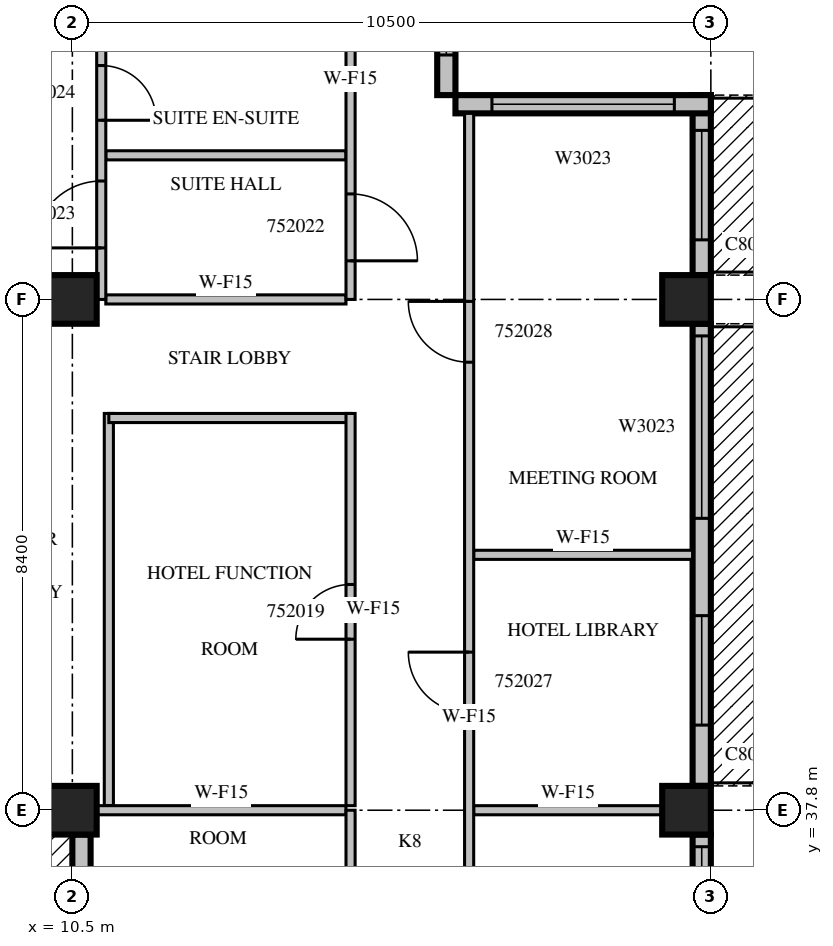
"""IFC4 building model, lengths in metres.
Left out: names, types, materials, properties, quantities, classifications, styles, units other than length and angle.
Written with IfcOpenShell. Run it as: python <this file> out.ifc"""

import sys

from ifc_helpers import new_model, si_unit, direction, frame, frame_2d, origin, origin_2d, place, context, subcontext, project, spatial, rectangle, extrude, source, transform, mapped, element, fill, save


model = new_model("IFC4")
c1 = context("Model", 3, precision=1e-05, world=origin(), true_north=direction((0.0, 1.0)))
c2 = subcontext(c1, "Body", "Model", "MODEL_VIEW")
j1 = project(units=[si_unit("LENGTHUNIT", "METRE"), si_unit("PLANEANGLEUNIT", "RADIAN")], contexts=[c1])
p1 = place(None, origin())
s1 = spatial("IfcSite", under=j1, at=p1, CompositionType="ELEMENT")
p2 = place(p1, origin())
s2 = spatial("IfcBuilding", under=s1, at=p2, CompositionType="ELEMENT")
p3 = place(p2, frame((0.0, 0.0, 231.0)))
s3 = spatial("IfcBuildingStorey", under=s2, at=p3, CompositionType="ELEMENT", Elevation=231.0)
m1 = source(origin(), c2, "Body", "SweptSolid", [
    extrude(rectangle(XDim=0.8, YDim=0.8, at=origin_2d()), origin(), (0.0, 0.0, 1.0), 3.8),
])
for number, where, z_axis, x_axis in (
    (1, (10.5, 37.8, 0.0), (0.0, 0.0, 1.0), (1.0, 0.0, 0.0)),
    (2, (20.6, 37.8, 0.0), (0.0, 0.0, 1.0), (1.0, 0.0, 0.0)),
    (3, (10.5, 46.2, 0.0), (0.0, 0.0, 1.0), (1.0, 0.0, 0.0)),
    (4, (20.6, 46.2, 0.0), (0.0, 0.0, 1.0), (1.0, 0.0, 0.0)),
):
    element("IfcColumn", number, at=place(p3, frame(where, z_axis=z_axis, x_axis=x_axis)), inside=s3, PredefinedType="COLUMN", context=c2, shape_type="MappedRepresentation", body=[
        mapped(m1, transform((0.0, 0.0, 0.0), scale=1.0)),
    ])
m2 = source(origin(), c2, "Body", "SweptSolid", [
    extrude(rectangle(XDim=7.6, YDim=0.3, at=frame_2d((3.8, 0.0))), origin(), (0.0, 0.0, 1.0), 3.4),
])
p4 = place(p3, frame((20.85, 29.8, 0.0), z_axis=(0.0, 0.0, 1.0), x_axis=(0.0, 1.0, 0.0)))
e5 = element("IfcWall", 5, at=p4, inside=s3, PredefinedType="STANDARD", context=c2, shape_type="MappedRepresentation", body=[
    mapped(m2, transform((0.0, 0.0, 0.0), scale=1.0)),
])
m3 = source(origin(), c2, "Body", "SweptSolid", [
    extrude(rectangle(XDim=3.0, YDim=2.3, at=frame_2d((1.5, 1.15))), frame((0.0, 0.16, 0.0), z_axis=(0.0, -1.0, 0.0), x_axis=(1.0, 0.0, 0.0)), (0.0, 0.0, 1.0), 0.32),
])
p5 = place(p4, frame((0.2, 0.0, 0.6)))
e6 = element("IfcOpeningElement", 6, at=p5, cuts=e5, PredefinedType="OPENING", context=c2, shape_type="MappedRepresentation", body=[
    mapped(m3, transform((0.0, 0.0, 0.0), scale=1.0)),
])
p6 = place(p4, frame((4.4, 0.0, 0.6)))
e7 = element("IfcOpeningElement", 7, at=p6, cuts=e5, PredefinedType="OPENING", context=c2, shape_type="MappedRepresentation", body=[
    mapped(m3, transform((0.0, 0.0, 0.0), scale=1.0)),
])
p7 = place(p3, frame((20.85, 38.2, 0.0), z_axis=(0.0, 0.0, 1.0), x_axis=(0.0, 1.0, 0.0)))
e8 = element("IfcWall", 8, at=p7, inside=s3, PredefinedType="STANDARD", context=c2, shape_type="MappedRepresentation", body=[
    mapped(m2, transform((0.0, 0.0, 0.0), scale=1.0)),
])
m4 = source(origin(), c2, "Body", "SweptSolid", [
    extrude(rectangle(XDim=1.8, YDim=2.4, at=frame_2d((0.9, 1.2))), frame((0.0, 0.16, 0.0), z_axis=(0.0, -1.0, 0.0), x_axis=(1.0, 0.0, 0.0)), (0.0, 0.0, 1.0), 0.32),
])
p8 = place(p7, frame((1.0, 0.0, 0.0)))
e9 = element("IfcOpeningElement", 9, at=p8, cuts=e8, PredefinedType="OPENING", context=c2, shape_type="MappedRepresentation", body=[
    mapped(m4, transform((0.0, 0.0, 0.0), scale=1.0)),
])
p9 = place(p7, frame((4.4, 0.0, 0.6)))
e10 = element("IfcOpeningElement", 10, at=p9, cuts=e8, PredefinedType="OPENING", context=c2, shape_type="MappedRepresentation", body=[
    mapped(m3, transform((0.0, 0.0, 0.0), scale=1.0)),
])
m5 = source(origin(), c2, "Body", "SweptSolid", [
    extrude(rectangle(XDim=2.96, YDim=0.3, at=frame_2d((1.48, 0.0))), origin(), (0.0, 0.0, 1.0), 3.4),
])
p10 = place(p3, frame((20.85, 46.6, 0.0), z_axis=(0.0, 0.0, 1.0), x_axis=(0.0, 1.0, 0.0)))
e11 = element("IfcWall", 11, at=p10, inside=s3, PredefinedType="STANDARD", context=c2, shape_type="MappedRepresentation", body=[
    mapped(m5, transform((0.0, 0.0, 0.0), scale=1.0)),
])
p11 = place(p10, frame((0.58, 0.0, 0.0)))
e12 = element("IfcOpeningElement", 12, at=p11, cuts=e11, PredefinedType="OPENING", context=c2, shape_type="MappedRepresentation", body=[
    mapped(m4, transform((0.0, 0.0, 0.0), scale=1.0)),
])
m6 = source(origin(), c2, "Body", "SweptSolid", [
    extrude(rectangle(XDim=4.2, YDim=0.3, at=frame_2d((2.1, 0.0))), origin(), (0.0, 0.0, 1.0), 3.4),
])
p12 = place(p3, frame((21.0, 49.41, 0.0), z_axis=(0.0, 0.0, 1.0), x_axis=(-1.0, 0.0, 0.0)))
e13 = element("IfcWall", 13, at=p12, inside=s3, PredefinedType="STANDARD", context=c2, shape_type="MappedRepresentation", body=[
    mapped(m6, transform((0.0, 0.0, 0.0), scale=1.0)),
])
p13 = place(p12, frame((0.6, 0.0, 0.6)))
e14 = element("IfcOpeningElement", 14, at=p13, cuts=e13, PredefinedType="OPENING", context=c2, shape_type="MappedRepresentation", body=[
    mapped(m3, transform((0.0, 0.0, 0.0), scale=1.0)),
])
m7 = source(origin(), c2, "Body", "SweptSolid", [
    extrude(rectangle(XDim=2.52, YDim=0.3, at=frame_2d((1.26, 0.0))), origin(), (0.0, 0.0, 1.0), 3.4),
])
p14 = place(p3, frame((16.65, 49.56, 0.0), z_axis=(0.0, 0.0, 1.0), x_axis=(0.0, 1.0, 0.0)))
e15 = element("IfcWall", 15, at=p14, inside=s3, PredefinedType="STANDARD", context=c2, shape_type="MappedRepresentation", body=[
    mapped(m7, transform((0.0, 0.0, 0.0), scale=1.0)),
])
m8 = source(origin(), c2, "Body", "SweptSolid", [
    extrude(rectangle(XDim=1.2, YDim=2.3, at=frame_2d((0.6, 1.15))), frame((0.0, 0.16, 0.0), z_axis=(0.0, -1.0, 0.0), x_axis=(1.0, 0.0, 0.0)), (0.0, 0.0, 1.0), 0.32),
])
p15 = place(p14, frame((0.66, 0.0, 0.6)))
e16 = element("IfcOpeningElement", 16, at=p15, cuts=e15, PredefinedType="OPENING", context=c2, shape_type="MappedRepresentation", body=[
    mapped(m8, transform((0.0, 0.0, 0.0), scale=1.0)),
])
p16 = place(p3, frame((10.65, 37.4, 0.0), z_axis=(0.0, 0.0, 1.0), x_axis=(0.0, -1.0, 0.0)))
e17 = element("IfcWall", 17, at=p16, inside=s3, PredefinedType="STANDARD", context=c2, shape_type="MappedRepresentation", body=[
    mapped(m2, transform((0.0, 0.0, 0.0), scale=1.0)),
])
p17 = place(p16, frame((0.65, 0.0, 0.0)))
e18 = element("IfcOpeningElement", 18, at=p17, cuts=e17, PredefinedType="OPENING", context=c2, shape_type="MappedRepresentation", body=[
    mapped(m4, transform((0.0, 0.0, 0.0), scale=1.0)),
])
p18 = place(p16, frame((4.061, 0.0, 0.6)))
e19 = element("IfcOpeningElement", 19, at=p18, cuts=e17, PredefinedType="OPENING", context=c2, shape_type="MappedRepresentation", body=[
    mapped(m8, transform((0.0, 0.0, 0.0), scale=1.0)),
])
m9 = source(origin(), c2, "Body", "SweptSolid", [
    extrude(rectangle(XDim=6.45, YDim=0.15, at=frame_2d((3.225, 0.0))), origin(), (0.0, 0.0, 1.0), 3.4),
])
p19 = place(p3, frame((11.1, 44.325, 0.0), z_axis=(0.0, 0.0, 1.0), x_axis=(0.0, -1.0, 0.0)))
e20 = element("IfcWall", 20, at=p19, inside=s3, PredefinedType="PARTITIONING", context=c2, shape_type="MappedRepresentation", body=[
    mapped(m9, transform((0.0, 0.0, 0.0), scale=1.0)),
])
m10 = source(origin(), c2, "Body", "SweptSolid", [
    extrude(rectangle(XDim=3.975, YDim=0.15, at=frame_2d((1.988, 0.0))), origin(), (0.0, 0.0, 1.0), 3.4),
])
p20 = place(p3, frame((15.075, 44.25, 0.0), z_axis=(0.0, 0.0, 1.0), x_axis=(-1.0, 0.0, 0.0)))
e21 = element("IfcWall", 21, at=p20, inside=s3, PredefinedType="PARTITIONING", context=c2, shape_type="MappedRepresentation", body=[
    mapped(m10, transform((0.0, 0.0, 0.0), scale=1.0)),
])
p21 = place(p3, frame((15.075, 37.875, 0.0), z_axis=(0.0, 0.0, 1.0), x_axis=(0.0, 1.0, 0.0)))
e22 = element("IfcWall", 22, at=p21, inside=s3, PredefinedType="PARTITIONING", context=c2, shape_type="MappedRepresentation", body=[
    mapped(m9, transform((0.0, 0.0, 0.0), scale=1.0)),
])
m11 = source(origin(), c2, "Body", "SweptSolid", [
    extrude(rectangle(XDim=0.9, YDim=2.1, at=frame_2d((0.45, 1.05))), frame((0.0, 0.085, 0.0), z_axis=(0.0, -1.0, 0.0), x_axis=(1.0, 0.0, 0.0)), (0.0, 0.0, 1.0), 0.17),
])
p22 = place(p21, frame((2.737, 0.0, 0.0)))
e23 = element("IfcOpeningElement", 23, at=p22, cuts=e22, PredefinedType="OPENING", context=c2, shape_type="MappedRepresentation", body=[
    mapped(m11, transform((0.0, 0.0, 0.0), scale=1.0)),
])
m12 = source(origin(), c2, "Body", "SweptSolid", [
    extrude(rectangle(XDim=4.101, YDim=0.15, at=frame_2d((2.05, 0.0))), origin(), (0.0, 0.0, 1.0), 3.4),
])
p23 = place(p3, frame((15.0, 37.8, 0.0), z_axis=(0.0, 0.0, 1.0), x_axis=(-1.0, 0.0, 0.0)))
e24 = element("IfcWall", 24, at=p23, inside=s3, PredefinedType="PARTITIONING", context=c2, shape_type="MappedRepresentation", body=[
    mapped(m12, transform((0.0, 0.0, 0.0), scale=1.0)),
])
m13 = source(origin(), c2, "Body", "SweptSolid", [
    extrude(rectangle(XDim=3.95, YDim=0.15, at=frame_2d((1.975, 0.0))), origin(), (0.0, 0.0, 1.0), 3.4),
])
for number, where, z_axis, x_axis in (
    (25, (15.0, 48.57, 0.0), (0.0, 0.0, 1.0), (-1.0, 0.0, 0.0)),
    (26, (15.0, 46.2, 0.0), (0.0, 0.0, 1.0), (-1.0, 0.0, 0.0)),
):
    element("IfcWall", number, at=place(p3, frame(where, z_axis=z_axis, x_axis=x_axis)), inside=s3, PredefinedType="PARTITIONING", context=c2, shape_type="MappedRepresentation", body=[
        mapped(m13, transform((0.0, 0.0, 0.0), scale=1.0)),
    ])
m14 = source(origin(), c2, "Body", "SweptSolid", [
    extrude(rectangle(XDim=7.26, YDim=0.15, at=frame_2d((3.63, 0.0))), origin(), (0.0, 0.0, 1.0), 3.4),
])
p24 = place(p3, frame((10.975, 46.2, 0.0), z_axis=(0.0, 0.0, 1.0), x_axis=(0.0, 1.0, 0.0)))
e27 = element("IfcWall", 27, at=p24, inside=s3, PredefinedType="PARTITIONING", context=c2, shape_type="MappedRepresentation", body=[
    mapped(m14, transform((0.0, 0.0, 0.0), scale=1.0)),
])
m15 = source(origin(), c2, "Body", "SweptSolid", [
    extrude(rectangle(XDim=1.1, YDim=2.1, at=frame_2d((0.55, 1.05))), frame((0.0, 0.085, 0.0), z_axis=(0.0, -1.0, 0.0), x_axis=(1.0, 0.0, 0.0)), (0.0, 0.0, 1.0), 0.17),
])
p25 = place(p24, frame((0.847, 0.0, 0.0)))
e28 = element("IfcOpeningElement", 28, at=p25, cuts=e27, PredefinedType="OPENING", context=c2, shape_type="MappedRepresentation", body=[
    mapped(m15, transform((0.0, 0.0, 0.0), scale=1.0)),
])
p26 = place(p24, frame((2.946, 0.0, 0.0)))
e29 = element("IfcOpeningElement", 29, at=p26, cuts=e27, PredefinedType="OPENING", context=c2, shape_type="MappedRepresentation", body=[
    mapped(m11, transform((0.0, 0.0, 0.0), scale=1.0)),
])
p27 = place(p24, frame((4.529, 0.0, 0.0)))
e30 = element("IfcOpeningElement", 30, at=p27, cuts=e27, PredefinedType="OPENING", context=c2, shape_type="MappedRepresentation", body=[
    mapped(m11, transform((0.0, 0.0, 0.0), scale=1.0)),
])
m16 = source(origin(), c2, "Body", "SweptSolid", [
    extrude(rectangle(XDim=3.101, YDim=0.15, at=frame_2d((1.55, 0.0))), origin(), (0.0, 0.0, 1.0), 3.4),
])
p28 = place(p3, frame((20.201, 37.8, 0.0), z_axis=(0.0, 0.0, 1.0), x_axis=(-1.0, 0.0, 0.0)))
e31 = element("IfcWall", 31, at=p28, inside=s3, PredefinedType="PARTITIONING", context=c2, shape_type="MappedRepresentation", body=[
    mapped(m16, transform((0.0, 0.0, 0.0), scale=1.0)),
])
m17 = source(origin(), c2, "Body", "SweptSolid", [
    extrude(rectangle(XDim=3.6, YDim=0.15, at=frame_2d((1.8, 0.0))), origin(), (0.0, 0.0, 1.0), 3.4),
])
p29 = place(p3, frame((20.7, 42.0, 0.0), z_axis=(0.0, 0.0, 1.0), x_axis=(-1.0, 0.0, 0.0)))
e32 = element("IfcWall", 32, at=p29, inside=s3, PredefinedType="PARTITIONING", context=c2, shape_type="MappedRepresentation", body=[
    mapped(m17, transform((0.0, 0.0, 0.0), scale=1.0)),
])
m18 = source(origin(), c2, "Body", "SweptSolid", [
    extrude(rectangle(XDim=8.4, YDim=0.15, at=frame_2d((4.2, 0.0))), origin(), (0.0, 0.0, 1.0), 3.4),
])
p30 = place(p3, frame((15.075, 29.4, 0.0), z_axis=(0.0, 0.0, 1.0), x_axis=(0.0, 1.0, 0.0)))
e33 = element("IfcWall", 33, at=p30, inside=s3, PredefinedType="PARTITIONING", context=c2, shape_type="MappedRepresentation", body=[
    mapped(m18, transform((0.0, 0.0, 0.0), scale=1.0)),
])
p31 = place(p30, frame((0.638, 0.0, 0.0)))
e34 = element("IfcOpeningElement", 34, at=p31, cuts=e33, PredefinedType="OPENING", context=c2, shape_type="MappedRepresentation", body=[
    mapped(m15, transform((0.0, 0.0, 0.0), scale=1.0)),
])
p32 = place(p3, frame((15.075, 46.2, 0.0), z_axis=(0.0, 0.0, 1.0), x_axis=(0.0, 1.0, 0.0)))
e35 = element("IfcWall", 35, at=p32, inside=s3, PredefinedType="PARTITIONING", context=c2, shape_type="MappedRepresentation", body=[
    mapped(m14, transform((0.0, 0.0, 0.0), scale=1.0)),
])
p33 = place(p32, frame((0.635, 0.0, 0.0)))
e36 = element("IfcOpeningElement", 36, at=p33, cuts=e35, PredefinedType="OPENING", context=c2, shape_type="MappedRepresentation", body=[
    mapped(m15, transform((0.0, 0.0, 0.0), scale=1.0)),
])
m19 = source(origin(), c2, "Body", "SweptSolid", [
    extrude(rectangle(XDim=19.86, YDim=0.15, at=frame_2d((9.93, 0.0))), origin(), (0.0, 0.0, 1.0), 3.4),
])
p34 = place(p3, frame((17.025, 49.26, 0.0), z_axis=(0.0, 0.0, 1.0), x_axis=(0.0, -1.0, 0.0)))
e37 = element("IfcWall", 37, at=p34, inside=s3, PredefinedType="PARTITIONING", context=c2, shape_type="MappedRepresentation", body=[
    mapped(m19, transform((0.0, 0.0, 0.0), scale=1.0)),
])
m20 = source(origin(), c2, "Body", "SweptSolid", [
    extrude(rectangle(XDim=1.2, YDim=2.1, at=frame_2d((0.6, 1.05))), frame((0.0, 0.085, 0.0), z_axis=(0.0, -1.0, 0.0), x_axis=(1.0, 0.0, 0.0)), (0.0, 0.0, 1.0), 0.17),
])
p35 = place(p34, frame((15.06, 0.0, 0.0)))
e38 = element("IfcOpeningElement", 38, at=p35, cuts=e37, PredefinedType="OPENING", context=c2, shape_type="MappedRepresentation", body=[
    mapped(m20, transform((0.0, 0.0, 0.0), scale=1.0)),
])
m21 = source(origin(), c2, "Body", "SweptSolid", [
    extrude(rectangle(XDim=1.0, YDim=2.1, at=frame_2d((0.5, 1.05))), frame((0.0, 0.085, 0.0), z_axis=(0.0, -1.0, 0.0), x_axis=(1.0, 0.0, 0.0)), (0.0, 0.0, 1.0), 0.17),
])
p36 = place(p34, frame((8.86, 0.0, 0.0)))
e39 = element("IfcOpeningElement", 39, at=p36, cuts=e37, PredefinedType="OPENING", context=c2, shape_type="MappedRepresentation", body=[
    mapped(m21, transform((0.0, 0.0, 0.0), scale=1.0)),
])
p37 = place(p34, frame((3.092, 0.0, 0.0)))
e40 = element("IfcOpeningElement", 40, at=p37, cuts=e37, PredefinedType="OPENING", context=c2, shape_type="MappedRepresentation", body=[
    mapped(m21, transform((0.0, 0.0, 0.0), scale=1.0)),
])
m22 = source(origin(), c2, "Body", "SweptSolid", [
    extrude(rectangle(XDim=3.0, YDim=2.3, at=frame_2d((1.5, 1.15))), frame((0.0, 0.03, 0.0), z_axis=(0.0, -1.0, 0.0), x_axis=(1.0, 0.0, 0.0)), (0.0, 0.0, 1.0), 0.06),
])
p38 = place(p6, origin())
e41 = element("IfcWindow", 41, at=p38, inside=s3, PartitioningType="SINGLE_PANEL", PredefinedType="WINDOW", context=c2, shape_type="MappedRepresentation", body=[
    mapped(m22, transform((0.0, 0.0, 0.0), scale=1.0)),
])
fill(e7, e41)
m23 = source(origin(), c2, "Body", "SweptSolid", [
    extrude(rectangle(XDim=1.8, YDim=2.4, at=frame_2d((0.9, 1.2))), frame((0.0, 0.025, 0.0), z_axis=(0.0, -1.0, 0.0), x_axis=(1.0, 0.0, 0.0)), (0.0, 0.0, 1.0), 0.05),
])
p39 = place(p8, origin())
e42 = element("IfcDoor", 42, at=p39, inside=s3, OperationType="SLIDING_TO_LEFT", PredefinedType="DOOR", context=c2, shape_type="MappedRepresentation", body=[
    mapped(m23, transform((0.0, 0.0, 0.0), scale=1.0)),
])
fill(e9, e42)
p40 = place(p9, origin())
e43 = element("IfcWindow", 43, at=p40, inside=s3, PartitioningType="SINGLE_PANEL", PredefinedType="WINDOW", context=c2, shape_type="MappedRepresentation", body=[
    mapped(m22, transform((0.0, 0.0, 0.0), scale=1.0)),
])
fill(e10, e43)
p41 = place(p11, origin())
e44 = element("IfcDoor", 44, at=p41, inside=s3, OperationType="SLIDING_TO_LEFT", PredefinedType="DOOR", context=c2, shape_type="MappedRepresentation", body=[
    mapped(m23, transform((0.0, 0.0, 0.0), scale=1.0)),
])
fill(e12, e44)
p42 = place(p13, origin())
e45 = element("IfcWindow", 45, at=p42, inside=s3, PartitioningType="SINGLE_PANEL", PredefinedType="WINDOW", context=c2, shape_type="MappedRepresentation", body=[
    mapped(m22, transform((0.0, 0.0, 0.0), scale=1.0)),
])
fill(e14, e45)
m24 = source(origin(), c2, "Body", "SweptSolid", [
    extrude(rectangle(XDim=1.2, YDim=2.3, at=frame_2d((0.6, 1.15))), frame((0.0, 0.03, 0.0), z_axis=(0.0, -1.0, 0.0), x_axis=(1.0, 0.0, 0.0)), (0.0, 0.0, 1.0), 0.06),
])
p43 = place(p15, origin())
e46 = element("IfcWindow", 46, at=p43, inside=s3, PartitioningType="SINGLE_PANEL", PredefinedType="WINDOW", context=c2, shape_type="MappedRepresentation", body=[
    mapped(m24, transform((0.0, 0.0, 0.0), scale=1.0)),
])
fill(e16, e46)
m25 = source(origin(), c2, "Body", "SweptSolid", [
    extrude(rectangle(XDim=0.9, YDim=2.1, at=frame_2d((0.45, 1.05))), frame((0.0, 0.025, 0.0), z_axis=(0.0, -1.0, 0.0), x_axis=(1.0, 0.0, 0.0)), (0.0, 0.0, 1.0), 0.05),
])
p44 = place(p22, origin())
e47 = element("IfcDoor", 47, at=p44, inside=s3, OperationType="SINGLE_SWING_LEFT", PredefinedType="DOOR", context=c2, shape_type="MappedRepresentation", body=[
    mapped(m25, transform((0.0, 0.0, 0.0), scale=1.0)),
])
fill(e23, e47)
m26 = source(origin(), c2, "Body", "SweptSolid", [
    extrude(rectangle(XDim=1.1, YDim=2.1, at=frame_2d((0.55, 1.05))), frame((0.0, 0.025, 0.0), z_axis=(0.0, -1.0, 0.0), x_axis=(1.0, 0.0, 0.0)), (0.0, 0.0, 1.0), 0.05),
])
p45 = place(p33, origin())
e48 = element("IfcDoor", 48, at=p45, inside=s3, OperationType="SINGLE_SWING_RIGHT", PredefinedType="DOOR", context=c2, shape_type="MappedRepresentation", body=[
    mapped(m26, transform((0.0, 0.0, 0.0), scale=1.0)),
])
fill(e36, e48)
p46 = place(p25, origin())
e49 = element("IfcDoor", 49, at=p46, inside=s3, OperationType="SINGLE_SWING_LEFT", PredefinedType="DOOR", context=c2, shape_type="MappedRepresentation", body=[
    mapped(m26, transform((0.0, 0.0, 0.0), scale=1.0)),
])
fill(e28, e49)
p47 = place(p26, origin())
e50 = element("IfcDoor", 50, at=p47, inside=s3, OperationType="SINGLE_SWING_RIGHT", PredefinedType="DOOR", context=c2, shape_type="MappedRepresentation", body=[
    mapped(m25, transform((0.0, 0.0, 0.0), scale=1.0)),
])
fill(e29, e50)
m27 = source(origin(), c2, "Body", "SweptSolid", [
    extrude(rectangle(XDim=1.0, YDim=2.1, at=frame_2d((0.5, 1.05))), frame((0.0, 0.025, 0.0), z_axis=(0.0, -1.0, 0.0), x_axis=(1.0, 0.0, 0.0)), (0.0, 0.0, 1.0), 0.05),
])
p48 = place(p36, origin())
e51 = element("IfcDoor", 51, at=p48, inside=s3, OperationType="SINGLE_SWING_RIGHT", PredefinedType="DOOR", context=c2, shape_type="MappedRepresentation", body=[
    mapped(m27, transform((0.0, 0.0, 0.0), scale=1.0)),
])
fill(e39, e51)
p49 = place(p37, origin())
e52 = element("IfcDoor", 52, at=p49, inside=s3, OperationType="SINGLE_SWING_RIGHT", PredefinedType="DOOR", context=c2, shape_type="MappedRepresentation", body=[
    mapped(m27, transform((0.0, 0.0, 0.0), scale=1.0)),
])
fill(e40, e52)
save(model, sys.argv[1])
